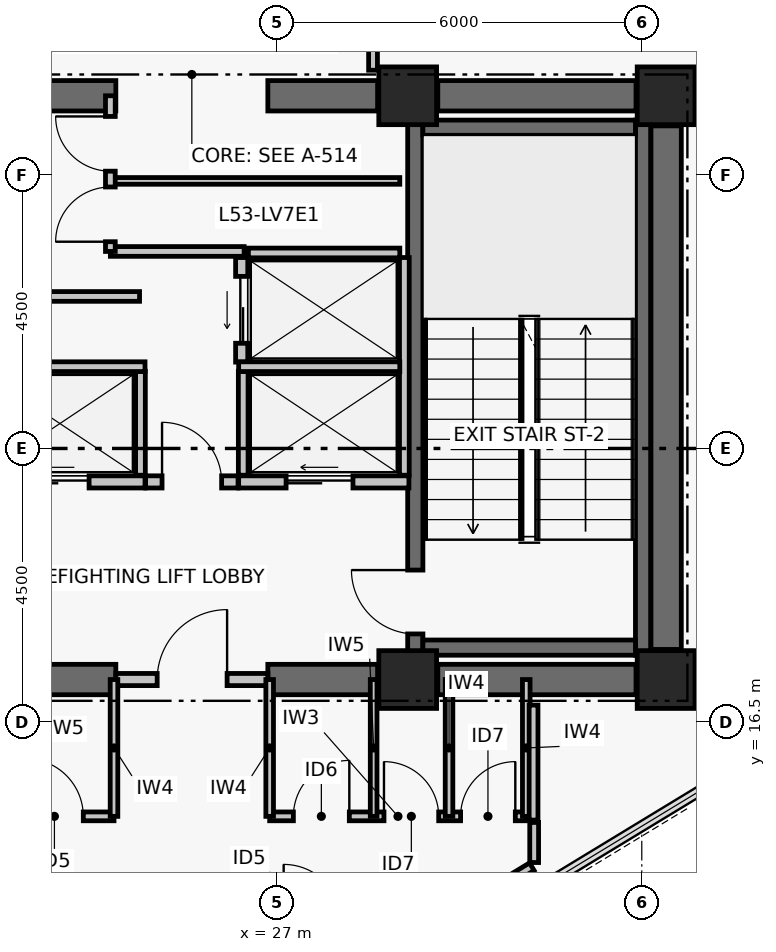
"""IFC4 building model, lengths in metres.
Left out: names, types, materials, properties, quantities, classifications, styles, units other than length and angle.
Written with IfcOpenShell. Run it as: python <this file> out.ifc"""

import sys

from ifc_helpers import new_model, si_unit, direction, frame, frame_2d, origin, origin_2d, place, context, subcontext, project, spatial, rectangle, extrude, element, fill, save


model = new_model("IFC4")
c1 = context("Model", 3, precision=1e-05, world=origin(), true_north=direction((0.0, 1.0)))
c2 = subcontext(c1, "Body", "Model", "MODEL_VIEW")
j1 = project(units=[si_unit("LENGTHUNIT", "METRE"), si_unit("PLANEANGLEUNIT", "RADIAN")], contexts=[c1])
p1 = place(None, origin())
s1 = spatial("IfcSite", under=j1, at=p1, CompositionType="ELEMENT")
p2 = place(p1, origin())
s2 = spatial("IfcBuilding", under=s1, at=p2, CompositionType="ELEMENT")
p3 = place(p2, frame((0.0, 0.0, 210.12)))
s3 = spatial("IfcBuildingStorey", under=s2, at=p3, CompositionType="ELEMENT", Elevation=210.12)
for number, where, z_axis, x_axis in (
    (1, (29.15, 17.2, 0.0), (0.0, 0.0, 1.0), (1.0, 0.0, 0.0)),
    (2, (33.4, 17.2, 0.0), (0.0, 0.0, 1.0), (1.0, 0.0, 0.0)),
    (3, (29.15, 26.8, 0.0), (0.0, 0.0, 1.0), (1.0, 0.0, 0.0)),
    (4, (33.4, 26.8, 0.0), (0.0, 0.0, 1.0), (1.0, 0.0, 0.0)),
):
    element("IfcColumn", number, at=place(p3, frame(where, z_axis=z_axis, x_axis=x_axis)), inside=s3, PredefinedType="COLUMN", context=c2, shape_type="SweptSolid", body=[
        extrude(rectangle(XDim=0.95, YDim=0.95, at=origin_2d()), origin(), (0.0, 0.0, 1.0), 3.72),
    ])
p4 = place(p3, frame((22.545, 17.2, 0.0), z_axis=(0.0, 0.0, 1.0), x_axis=(1.0, 0.0, 0.0)))
e5 = element("IfcWall", 5, at=p4, inside=s3, PredefinedType="SHEAR", context=c2, shape_type="SweptSolid", body=[
    extrude(rectangle(XDim=1.805, YDim=0.5, at=frame_2d((0.903, 0.0))), origin(), (0.0, 0.0, 1.0), 3.38),
])
p5 = place(p3, frame((26.85, 17.2, 0.0), z_axis=(0.0, 0.0, 1.0), x_axis=(1.0, 0.0, 0.0)))
e6 = element("IfcWall", 6, at=p5, inside=s3, PredefinedType="SHEAR", context=c2, shape_type="SweptSolid", body=[
    extrude(rectangle(XDim=1.805, YDim=0.5, at=frame_2d((0.902, 0.0))), origin(), (0.0, 0.0, 1.0), 3.38),
])
p6 = place(p3, frame((29.645, 17.2, 0.0), z_axis=(0.0, 0.0, 1.0), x_axis=(1.0, 0.0, 0.0)))
e7 = element("IfcWall", 7, at=p6, inside=s3, PredefinedType="SHEAR", context=c2, shape_type="SweptSolid", body=[
    extrude(rectangle(XDim=3.26, YDim=0.5, at=frame_2d((1.63, 0.0))), origin(), (0.0, 0.0, 1.0), 3.38),
])
p7 = place(p3, frame((22.545, 26.8, 0.0), z_axis=(0.0, 0.0, 1.0), x_axis=(1.0, 0.0, 0.0)))
e8 = element("IfcWall", 8, at=p7, inside=s3, PredefinedType="SHEAR", context=c2, shape_type="SweptSolid", body=[
    extrude(rectangle(XDim=1.805, YDim=0.5, at=frame_2d((0.903, 0.0))), origin(), (0.0, 0.0, 1.0), 3.38),
])
p8 = place(p3, frame((26.85, 26.8, 0.0), z_axis=(0.0, 0.0, 1.0), x_axis=(1.0, 0.0, 0.0)))
e9 = element("IfcWall", 9, at=p8, inside=s3, PredefinedType="SHEAR", context=c2, shape_type="SweptSolid", body=[
    extrude(rectangle(XDim=1.805, YDim=0.5, at=frame_2d((0.902, 0.0))), origin(), (0.0, 0.0, 1.0), 3.38),
])
p9 = place(p3, frame((29.645, 26.8, 0.0), z_axis=(0.0, 0.0, 1.0), x_axis=(1.0, 0.0, 0.0)))
e10 = element("IfcWall", 10, at=p9, inside=s3, PredefinedType="SHEAR", context=c2, shape_type="SweptSolid", body=[
    extrude(rectangle(XDim=3.26, YDim=0.5, at=frame_2d((1.63, 0.0))), origin(), (0.0, 0.0, 1.0), 3.38),
])
p10 = place(p3, frame((33.4, 17.695, 0.0), z_axis=(0.0, 0.0, 1.0), x_axis=(0.0, 1.0, 0.0)))
e11 = element("IfcWall", 11, at=p10, inside=s3, PredefinedType="SHEAR", context=c2, shape_type="SweptSolid", body=[
    extrude(rectangle(XDim=8.61, YDim=0.5, at=frame_2d((4.305, 0.0))), origin(), (0.0, 0.0, 1.0), 3.38),
])
p11 = place(p3, frame((29.275, 17.6, 0.0), z_axis=(0.0, 0.0, 1.0), x_axis=(0.0, 1.0, 0.0)))
e12 = element("IfcWall", 12, at=p11, inside=s3, PredefinedType="SHEAR", context=c2, shape_type="SweptSolid", body=[
    extrude(rectangle(XDim=8.8, YDim=0.25, at=frame_2d((4.4, 0.0))), origin(), (0.0, 0.0, 1.0), 3.38),
])
p12 = place(p11, frame((0.35, 0.0, 0.0)))
e13 = element("IfcOpeningElement", 13, at=p12, cuts=e12, PredefinedType="OPENING", context=c2, shape_type="SweptSolid", body=[
    extrude(rectangle(XDim=1.05, YDim=2.08, at=frame_2d((0.525, 1.04))), frame((0.0, 0.135, 0.0), z_axis=(0.0, -1.0, 0.0), x_axis=(1.0, 0.0, 0.0)), (0.0, 0.0, 1.0), 0.27),
])
p13 = place(p3, frame((33.021, 17.6, 0.0), z_axis=(0.0, 0.0, 1.0), x_axis=(0.0, 1.0, 0.0)))
e14 = element("IfcWall", 14, at=p13, inside=s3, PredefinedType="SHEAR", context=c2, shape_type="SweptSolid", body=[
    extrude(rectangle(XDim=8.8, YDim=0.25, at=frame_2d((4.4, 0.0))), origin(), (0.0, 0.0, 1.0), 3.38),
])
for number, where, z_axis, x_axis in (
    (15, (29.4, 17.725, 0.0), (0.0, 0.0, 1.0), (1.0, 0.0, 0.0)),
    (16, (29.4, 26.275, 0.0), (0.0, 0.0, 1.0), (1.0, 0.0, 0.0)),
):
    element("IfcWall", number, at=place(p3, frame(where, z_axis=z_axis, x_axis=x_axis)), inside=s3, PredefinedType="SHEAR", context=c2, shape_type="SweptSolid", body=[
        extrude(rectangle(XDim=3.496, YDim=0.25, at=frame_2d((1.748, 0.0))), origin(), (0.0, 0.0, 1.0), 3.38),
    ])
p14 = place(p3, frame((24.35, 17.2, 0.0), z_axis=(0.0, 0.0, 1.0), x_axis=(1.0, 0.0, 0.0)))
e17 = element("IfcWall", 17, at=p14, inside=s3, PredefinedType="PARTITIONING", context=c2, shape_type="SweptSolid", body=[
    extrude(rectangle(XDim=2.5, YDim=0.2, at=frame_2d((1.25, 0.0))), origin(), (0.0, 0.0, 1.0), 2.51),
])
p15 = place(p14, frame((0.68, 0.0, 0.0)))
e18 = element("IfcOpeningElement", 18, at=p15, cuts=e17, PredefinedType="OPENING", context=c2, shape_type="SweptSolid", body=[
    extrude(rectangle(XDim=1.15, YDim=2.08, at=frame_2d((0.575, 1.04))), frame((0.0, 0.11, 0.0), z_axis=(0.0, -1.0, 0.0), x_axis=(1.0, 0.0, 0.0)), (0.0, 0.0, 1.0), 0.22),
])
p16 = place(p3, frame((24.84, 20.45, 0.0), z_axis=(0.0, 0.0, 1.0), x_axis=(1.0, 0.0, 0.0)))
e19 = element("IfcWall", 19, at=p16, inside=s3, PredefinedType="PARTITIONING", context=c2, shape_type="SweptSolid", body=[
    extrude(rectangle(XDim=1.52, YDim=0.2, at=frame_2d((0.76, 0.0))), origin(), (0.0, 0.0, 1.0), 3.38),
])
p17 = place(p16, frame((0.27, 0.0, 0.0)))
e20 = element("IfcOpeningElement", 20, at=p17, cuts=e19, PredefinedType="OPENING", context=c2, shape_type="SweptSolid", body=[
    extrude(rectangle(XDim=0.98, YDim=2.06, at=frame_2d((0.49, 1.03))), frame((0.0, 0.11, 0.0), z_axis=(0.0, -1.0, 0.0), x_axis=(1.0, 0.0, 0.0)), (0.0, 0.0, 1.0), 0.22),
])
p18 = place(p3, frame((22.03, 20.45, 0.0), z_axis=(0.0, 0.0, 1.0), x_axis=(1.0, 0.0, 0.0)))
e21 = element("IfcWall", 21, at=p18, inside=s3, PredefinedType="PARTITIONING", context=c2, shape_type="SweptSolid", body=[
    extrude(rectangle(XDim=2.8, YDim=0.2, at=frame_2d((1.4, 0.0))), origin(), (0.0, 0.0, 1.0), 3.38),
])
p19 = place(p18, frame((0.78, 0.0, 0.0)))
e22 = element("IfcOpeningElement", 22, at=p19, cuts=e21, PredefinedType="OPENING", context=c2, shape_type="SweptSolid", body=[
    extrude(rectangle(XDim=1.1, YDim=2.08, at=frame_2d((0.55, 1.04))), frame((0.0, 0.11, 0.0), z_axis=(0.0, -1.0, 0.0), x_axis=(1.0, 0.0, 0.0)), (0.0, 0.0, 1.0), 0.22),
])
p20 = place(p3, frame((26.37, 20.45, 0.0), z_axis=(0.0, 0.0, 1.0), x_axis=(1.0, 0.0, 0.0)))
e23 = element("IfcWall", 23, at=p20, inside=s3, PredefinedType="PARTITIONING", context=c2, shape_type="SweptSolid", body=[
    extrude(rectangle(XDim=2.8, YDim=0.2, at=frame_2d((1.4, 0.0))), origin(), (0.0, 0.0, 1.0), 3.38),
])
p21 = place(p20, frame((0.78, 0.0, 0.0)))
e24 = element("IfcOpeningElement", 24, at=p21, cuts=e23, PredefinedType="OPENING", context=c2, shape_type="SweptSolid", body=[
    extrude(rectangle(XDim=1.1, YDim=2.08, at=frame_2d((0.55, 1.04))), frame((0.0, 0.11, 0.0), z_axis=(0.0, -1.0, 0.0), x_axis=(1.0, 0.0, 0.0)), (0.0, 0.0, 1.0), 0.22),
])
p22 = place(p3, frame((26.42, 22.42, 0.0), z_axis=(0.0, 0.0, 1.0), x_axis=(0.0, 1.0, 0.0)))
e25 = element("IfcWall", 25, at=p22, inside=s3, PredefinedType="PARTITIONING", context=c2, shape_type="SweptSolid", body=[
    extrude(rectangle(XDim=1.72, YDim=0.2, at=frame_2d((0.86, 0.0))), origin(), (0.0, 0.0, 1.0), 3.38),
])
p23 = place(p22, frame((0.31, 0.0, 0.0)))
e26 = element("IfcOpeningElement", 26, at=p23, cuts=e25, PredefinedType="OPENING", context=c2, shape_type="SweptSolid", body=[
    extrude(rectangle(XDim=1.1, YDim=2.08, at=frame_2d((0.55, 1.04))), frame((0.0, 0.11, 0.0), z_axis=(0.0, -1.0, 0.0), x_axis=(1.0, 0.0, 0.0)), (0.0, 0.0, 1.0), 0.22),
])
p24 = place(p3, frame((24.755, 20.56, 0.0), z_axis=(0.0, 0.0, 1.0), x_axis=(0.0, 1.0, 0.0)))
e27 = element("IfcWall", 27, at=p24, inside=s3, PredefinedType="PARTITIONING", context=c2, shape_type="SweptSolid", body=[
    extrude(rectangle(XDim=1.71, YDim=0.16, at=frame_2d((0.855, 0.0))), origin(), (0.0, 0.0, 1.0), 3.38),
])
p25 = place(p3, frame((22.18, 22.345, 0.0), z_axis=(0.0, 0.0, 1.0), x_axis=(1.0, 0.0, 0.0)))
e28 = element("IfcWall", 28, at=p25, inside=s3, PredefinedType="PARTITIONING", context=c2, shape_type="SweptSolid", body=[
    extrude(rectangle(XDim=2.65, YDim=0.16, at=frame_2d((1.325, 0.0))), origin(), (0.0, 0.0, 1.0), 3.38),
])
p26 = place(p3, frame((29.095, 20.56, 0.0), z_axis=(0.0, 0.0, 1.0), x_axis=(0.0, 1.0, 0.0)))
e29 = element("IfcWall", 29, at=p26, inside=s3, PredefinedType="PARTITIONING", context=c2, shape_type="SweptSolid", body=[
    extrude(rectangle(XDim=3.58, YDim=0.16, at=frame_2d((1.79, 0.0))), origin(), (0.0, 0.0, 1.0), 3.38),
])
p27 = place(p3, frame((26.445, 20.56, 0.0), z_axis=(0.0, 0.0, 1.0), x_axis=(0.0, 1.0, 0.0)))
e30 = element("IfcWall", 30, at=p27, inside=s3, PredefinedType="PARTITIONING", context=c2, shape_type="SweptSolid", body=[
    extrude(rectangle(XDim=1.71, YDim=0.16, at=frame_2d((0.855, 0.0))), origin(), (0.0, 0.0, 1.0), 3.38),
])
p28 = place(p3, frame((26.37, 22.345, 0.0), z_axis=(0.0, 0.0, 1.0), x_axis=(1.0, 0.0, 0.0)))
e31 = element("IfcWall", 31, at=p28, inside=s3, PredefinedType="PARTITIONING", context=c2, shape_type="SweptSolid", body=[
    extrude(rectangle(XDim=2.65, YDim=0.16, at=frame_2d((1.325, 0.0))), origin(), (0.0, 0.0, 1.0), 3.38),
])
p29 = place(p3, frame((26.53, 24.215, 0.0), z_axis=(0.0, 0.0, 1.0), x_axis=(1.0, 0.0, 0.0)))
e32 = element("IfcWall", 32, at=p29, inside=s3, PredefinedType="PARTITIONING", context=c2, shape_type="SweptSolid", body=[
    extrude(rectangle(XDim=2.49, YDim=0.16, at=frame_2d((1.245, 0.0))), origin(), (0.0, 0.0, 1.0), 3.38),
])
p30 = place(p3, frame((23.04, 23.5, 0.0), z_axis=(0.0, 0.0, 1.0), x_axis=(1.0, 0.0, 0.0)))
e33 = element("IfcWall", 33, at=p30, inside=s3, PredefinedType="PARTITIONING", context=c2, shape_type="SweptSolid", body=[
    extrude(rectangle(XDim=1.7, YDim=0.16, at=frame_2d((0.85, 0.0))), origin(), (0.0, 0.0, 1.0), 3.38),
])
p31 = place(p3, frame((24.26, 24.24, 0.0), z_axis=(0.0, 0.0, 1.0), x_axis=(1.0, 0.0, 0.0)))
e34 = element("IfcWall", 34, at=p31, inside=s3, PredefinedType="PARTITIONING", context=c2, shape_type="SweptSolid", body=[
    extrude(rectangle(XDim=2.2, YDim=0.16, at=frame_2d((1.1, 0.0))), origin(), (0.0, 0.0, 1.0), 3.38),
])
p32 = place(p3, frame((24.26, 25.4, 0.0), z_axis=(0.0, 0.0, 1.0), x_axis=(1.0, 0.0, 0.0)))
e35 = element("IfcWall", 35, at=p32, inside=s3, PredefinedType="PARTITIONING", context=c2, shape_type="SweptSolid", body=[
    extrude(rectangle(XDim=4.76, YDim=0.11, at=frame_2d((2.38, 0.0))), origin(), (0.0, 0.0, 1.0), 3.38),
])
p33 = place(p3, frame((24.26, 24.24, 0.0), z_axis=(0.0, 0.0, 1.0), x_axis=(0.0, 1.0, 0.0)))
e36 = element("IfcWall", 36, at=p33, inside=s3, PredefinedType="PARTITIONING", context=c2, shape_type="SweptSolid", body=[
    extrude(rectangle(XDim=2.56, YDim=0.16, at=frame_2d((1.28, 0.0))), origin(), (0.0, 0.0, 1.0), 2.51),
])
p34 = place(p33, frame((0.16, 0.0, 0.0)))
e37 = element("IfcOpeningElement", 37, at=p34, cuts=e36, PredefinedType="OPENING", context=c2, shape_type="SweptSolid", body=[
    extrude(rectangle(XDim=0.9, YDim=2.02, at=frame_2d((0.45, 1.01))), frame((0.0, 0.09, 0.0), z_axis=(0.0, -1.0, 0.0), x_axis=(1.0, 0.0, 0.0)), (0.0, 0.0, 1.0), 0.18),
])
p35 = place(p33, frame((1.32, 0.0, 0.0)))
e38 = element("IfcOpeningElement", 38, at=p35, cuts=e36, PredefinedType="OPENING", context=c2, shape_type="SweptSolid", body=[
    extrude(rectangle(XDim=0.9, YDim=2.02, at=frame_2d((0.45, 1.01))), frame((0.0, 0.09, 0.0), z_axis=(0.0, -1.0, 0.0), x_axis=(1.0, 0.0, 0.0)), (0.0, 0.0, 1.0), 0.18),
])
p36 = place(p3, frame((19.1, 14.95, 0.0), z_axis=(0.0, 0.0, 1.0), x_axis=(1.0, 0.0, 0.0)))
e39 = element("IfcWall", 39, at=p36, inside=s3, PredefinedType="PARTITIONING", context=c2, shape_type="SweptSolid", body=[
    extrude(rectangle(XDim=5.22, YDim=0.145, at=frame_2d((2.61, 0.0))), origin(), (0.0, 0.0, 1.0), 2.61),
])
p37 = place(p36, frame((0.2, 0.0, 0.0)))
e40 = element("IfcOpeningElement", 40, at=p37, cuts=e39, PredefinedType="OPENING", context=c2, shape_type="SweptSolid", body=[
    extrude(rectangle(XDim=0.9, YDim=2.02, at=frame_2d((0.45, 1.01))), frame((0.0, 0.083, 0.0), z_axis=(0.0, -1.0, 0.0), x_axis=(1.0, 0.0, 0.0)), (0.0, 0.0, 1.0), 0.165),
])
p38 = place(p36, frame((1.805, 0.0, 0.0)))
e41 = element("IfcOpeningElement", 41, at=p38, cuts=e39, PredefinedType="OPENING", context=c2, shape_type="SweptSolid", body=[
    extrude(rectangle(XDim=0.95, YDim=2.06, at=frame_2d((0.475, 1.03))), frame((0.0, 0.083, 0.0), z_axis=(0.0, -1.0, 0.0), x_axis=(1.0, 0.0, 0.0)), (0.0, 0.0, 1.0), 0.165),
])
p39 = place(p36, frame((3.765, 0.0, 0.0)))
e42 = element("IfcOpeningElement", 42, at=p39, cuts=e39, PredefinedType="OPENING", context=c2, shape_type="SweptSolid", body=[
    extrude(rectangle(XDim=0.95, YDim=2.06, at=frame_2d((0.475, 1.03))), frame((0.0, 0.083, 0.0), z_axis=(0.0, -1.0, 0.0), x_axis=(1.0, 0.0, 0.0)), (0.0, 0.0, 1.0), 0.165),
])
p40 = place(p3, frame((26.88, 14.95, 0.0), z_axis=(0.0, 0.0, 1.0), x_axis=(1.0, 0.0, 0.0)))
e43 = element("IfcWall", 43, at=p40, inside=s3, PredefinedType="PARTITIONING", context=c2, shape_type="SweptSolid", body=[
    extrude(rectangle(XDim=4.22, YDim=0.145, at=frame_2d((2.11, 0.0))), origin(), (0.0, 0.0, 1.0), 2.81),
])
p41 = place(p40, frame((0.39, 0.0, 0.0)))
e44 = element("IfcOpeningElement", 44, at=p41, cuts=e43, PredefinedType="OPENING", context=c2, shape_type="SweptSolid", body=[
    extrude(rectangle(XDim=0.92, YDim=2.05, at=frame_2d((0.46, 1.025))), frame((0.0, 0.083, 0.0), z_axis=(0.0, -1.0, 0.0), x_axis=(1.0, 0.0, 0.0)), (0.0, 0.0, 1.0), 0.165),
])
p42 = place(p40, frame((1.88, 0.0, 0.0)))
e45 = element("IfcOpeningElement", 45, at=p42, cuts=e43, PredefinedType="OPENING", context=c2, shape_type="SweptSolid", body=[
    extrude(rectangle(XDim=0.9, YDim=2.02, at=frame_2d((0.45, 1.01))), frame((0.0, 0.083, 0.0), z_axis=(0.0, -1.0, 0.0), x_axis=(1.0, 0.0, 0.0)), (0.0, 0.0, 1.0), 0.165),
])
p43 = place(p40, frame((3.14, 0.0, 0.0)))
e46 = element("IfcOpeningElement", 46, at=p43, cuts=e43, PredefinedType="OPENING", context=c2, shape_type="SweptSolid", body=[
    extrude(rectangle(XDim=0.9, YDim=2.02, at=frame_2d((0.45, 1.01))), frame((0.0, 0.083, 0.0), z_axis=(0.0, -1.0, 0.0), x_axis=(1.0, 0.0, 0.0)), (0.0, 0.0, 1.0), 0.165),
])
for number, where, z_axis, x_axis in (
    (47, (24.32, 14.95, 0.0), (0.0, 0.0, 1.0), (0.0, 1.0, 0.0)),
    (48, (26.88, 14.95, 0.0), (0.0, 0.0, 1.0), (0.0, 1.0, 0.0)),
):
    element("IfcWall", number, at=place(p3, frame(where, z_axis=z_axis, x_axis=x_axis)), inside=s3, PredefinedType="PARTITIONING", context=c2, shape_type="SweptSolid", body=[
        extrude(rectangle(XDim=2.25, YDim=0.125, at=frame_2d((1.125, 0.0))), origin(), (0.0, 0.0, 1.0), 2.51),
    ])
p44 = place(p3, frame((28.59, 14.95, 0.0), z_axis=(0.0, 0.0, 1.0), x_axis=(0.0, 1.0, 0.0)))
e49 = element("IfcWall", 49, at=p44, inside=s3, PredefinedType="PARTITIONING", context=c2, shape_type="SweptSolid", body=[
    extrude(rectangle(XDim=2.25, YDim=0.11, at=frame_2d((1.125, 0.0))), origin(), (0.0, 0.0, 1.0), 2.51),
])
for number, where, z_axis, x_axis in (
    (50, (29.83, 14.95, 0.0), (0.0, 0.0, 1.0), (0.0, 1.0, 0.0)),
    (51, (31.1, 14.95, 0.0), (0.0, 0.0, 1.0), (0.0, 1.0, 0.0)),
):
    element("IfcWall", number, at=place(p3, frame(where, z_axis=z_axis, x_axis=x_axis)), inside=s3, PredefinedType="PARTITIONING", context=c2, shape_type="SweptSolid", body=[
        extrude(rectangle(XDim=2.25, YDim=0.125, at=frame_2d((1.125, 0.0))), origin(), (0.0, 0.0, 1.0), 2.51),
    ])
p45 = place(p3, frame((29.709, 13.222, 0.0), z_axis=(0.0, 0.0, 1.0), x_axis=(0.854635840942, 0.519227868451, 0.0)))
e52 = element("IfcWall", 52, at=p45, inside=s3, PredefinedType="PARTITIONING", context=c2, shape_type="SweptSolid", body=[
    extrude(rectangle(XDim=1.735, YDim=0.145, at=frame_2d((0.867, 0.0))), origin(), (0.0, 0.0, 1.0), 3.38),
])
p46 = place(p3, frame((31.23, 14.191, 0.0), z_axis=(0.0, 0.0, 1.0), x_axis=(0.0, 1.0, 0.0)))
e53 = element("IfcWall", 53, at=p46, inside=s3, PredefinedType="PARTITIONING", context=c2, shape_type="SweptSolid", body=[
    extrude(rectangle(XDim=0.659, YDim=0.145, at=frame_2d((0.33, 0.0))), origin(), (0.0, 0.0, 1.0), 3.38),
])
p47 = place(p3, frame((31.22, 14.889, 0.0), z_axis=(0.0, 0.0, 1.0), x_axis=(0.0, 1.0, 0.0)))
e54 = element("IfcWall", 54, at=p47, inside=s3, PredefinedType="PARTITIONING", context=c2, shape_type="SweptSolid", body=[
    extrude(rectangle(XDim=1.891, YDim=0.145, at=frame_2d((0.946, 0.0))), origin(), (0.0, 0.0, 1.0), 2.51),
])
p48 = place(p3, frame((28.58, 27.22, 0.0), z_axis=(0.0, 0.0, 1.0), x_axis=(0.0, 1.0, 0.0)))
e55 = element("IfcWall", 55, at=p48, inside=s3, PredefinedType="PARTITIONING", context=c2, shape_type="SweptSolid", body=[
    extrude(rectangle(XDim=1.48, YDim=0.145, at=frame_2d((0.74, 0.0))), origin(), (0.0, 0.0, 1.0), 2.51),
])
p49 = place(p12, origin())
e56 = element("IfcDoor", 56, at=p49, inside=s3, OperationType="SINGLE_SWING_RIGHT", PredefinedType="DOOR", context=c2, shape_type="SweptSolid", body=[
    extrude(rectangle(XDim=1.05, YDim=2.08, at=frame_2d((0.525, 1.04))), frame((0.0, 0.025, 0.0), z_axis=(0.0, -1.0, 0.0), x_axis=(1.0, 0.0, 0.0)), (0.0, 0.0, 1.0), 0.05),
])
fill(e13, e56)
p50 = place(p15, origin())
e57 = element("IfcDoor", 57, at=p50, inside=s3, OperationType="SINGLE_SWING_RIGHT", PredefinedType="DOOR", context=c2, shape_type="SweptSolid", body=[
    extrude(rectangle(XDim=1.15, YDim=2.08, at=frame_2d((0.575, 1.04))), frame((0.0, 0.025, 0.0), z_axis=(0.0, -1.0, 0.0), x_axis=(1.0, 0.0, 0.0)), (0.0, 0.0, 1.0), 0.05),
])
fill(e18, e57)
p51 = place(p17, origin())
e58 = element("IfcDoor", 58, at=p51, inside=s3, OperationType="SINGLE_SWING_LEFT", PredefinedType="DOOR", context=c2, shape_type="SweptSolid", body=[
    extrude(rectangle(XDim=0.98, YDim=2.06, at=frame_2d((0.49, 1.03))), frame((0.0, 0.025, 0.0), z_axis=(0.0, -1.0, 0.0), x_axis=(1.0, 0.0, 0.0)), (0.0, 0.0, 1.0), 0.05),
])
fill(e20, e58)
p52 = place(p19, origin())
e59 = element("IfcDoor", 59, at=p52, inside=s3, OperationType="DOUBLE_DOOR_SLIDING", PredefinedType="DOOR", context=c2, shape_type="SweptSolid", body=[
    extrude(rectangle(XDim=1.1, YDim=2.08, at=frame_2d((0.55, 1.04))), frame((0.0, 0.025, 0.0), z_axis=(0.0, -1.0, 0.0), x_axis=(1.0, 0.0, 0.0)), (0.0, 0.0, 1.0), 0.05),
])
fill(e22, e59)
p53 = place(p21, origin())
e60 = element("IfcDoor", 60, at=p53, inside=s3, OperationType="DOUBLE_DOOR_SLIDING", PredefinedType="DOOR", context=c2, shape_type="SweptSolid", body=[
    extrude(rectangle(XDim=1.1, YDim=2.08, at=frame_2d((0.55, 1.04))), frame((0.0, 0.025, 0.0), z_axis=(0.0, -1.0, 0.0), x_axis=(1.0, 0.0, 0.0)), (0.0, 0.0, 1.0), 0.05),
])
fill(e24, e60)
p54 = place(p23, origin())
e61 = element("IfcDoor", 61, at=p54, inside=s3, OperationType="DOUBLE_DOOR_SLIDING", PredefinedType="DOOR", context=c2, shape_type="SweptSolid", body=[
    extrude(rectangle(XDim=1.1, YDim=2.08, at=frame_2d((0.55, 1.04))), frame((0.0, 0.025, 0.0), z_axis=(0.0, -1.0, 0.0), x_axis=(1.0, 0.0, 0.0)), (0.0, 0.0, 1.0), 0.05),
])
fill(e26, e61)
p55 = place(p34, origin())
e62 = element("IfcDoor", 62, at=p55, inside=s3, OperationType="SINGLE_SWING_LEFT", PredefinedType="DOOR", context=c2, shape_type="SweptSolid", body=[
    extrude(rectangle(XDim=0.9, YDim=2.02, at=frame_2d((0.45, 1.01))), frame((0.0, 0.025, 0.0), z_axis=(0.0, -1.0, 0.0), x_axis=(1.0, 0.0, 0.0)), (0.0, 0.0, 1.0), 0.05),
])
fill(e37, e62)
p56 = place(p35, origin())
e63 = element("IfcDoor", 63, at=p56, inside=s3, OperationType="SINGLE_SWING_RIGHT", PredefinedType="DOOR", context=c2, shape_type="SweptSolid", body=[
    extrude(rectangle(XDim=0.9, YDim=2.02, at=frame_2d((0.45, 1.01))), frame((0.0, 0.025, 0.0), z_axis=(0.0, -1.0, 0.0), x_axis=(1.0, 0.0, 0.0)), (0.0, 0.0, 1.0), 0.05),
])
fill(e38, e63)
p57 = place(p39, origin())
e64 = element("IfcDoor", 64, at=p57, inside=s3, OperationType="SINGLE_SWING_LEFT", PredefinedType="DOOR", context=c2, shape_type="SweptSolid", body=[
    extrude(rectangle(XDim=0.95, YDim=2.06, at=frame_2d((0.475, 1.03))), frame((0.0, 0.025, 0.0), z_axis=(0.0, -1.0, 0.0), x_axis=(1.0, 0.0, 0.0)), (0.0, 0.0, 1.0), 0.05),
])
fill(e42, e64)
p58 = place(p41, origin())
e65 = element("IfcDoor", 65, at=p58, inside=s3, OperationType="SINGLE_SWING_RIGHT", PredefinedType="DOOR", context=c2, shape_type="SweptSolid", body=[
    extrude(rectangle(XDim=0.92, YDim=2.05, at=frame_2d((0.46, 1.025))), frame((0.0, 0.025, 0.0), z_axis=(0.0, -1.0, 0.0), x_axis=(1.0, 0.0, 0.0)), (0.0, 0.0, 1.0), 0.05),
])
fill(e44, e65)
p59 = place(p42, origin())
e66 = element("IfcDoor", 66, at=p59, inside=s3, OperationType="SINGLE_SWING_LEFT", PredefinedType="DOOR", context=c2, shape_type="SweptSolid", body=[
    extrude(rectangle(XDim=0.9, YDim=2.02, at=frame_2d((0.45, 1.01))), frame((0.0, 0.025, 0.0), z_axis=(0.0, -1.0, 0.0), x_axis=(1.0, 0.0, 0.0)), (0.0, 0.0, 1.0), 0.05),
])
fill(e45, e66)
p60 = place(p43, origin())
e67 = element("IfcDoor", 67, at=p60, inside=s3, OperationType="SINGLE_SWING_RIGHT", PredefinedType="DOOR", context=c2, shape_type="SweptSolid", body=[
    extrude(rectangle(XDim=0.9, YDim=2.02, at=frame_2d((0.45, 1.01))), frame((0.0, 0.025, 0.0), z_axis=(0.0, -1.0, 0.0), x_axis=(1.0, 0.0, 0.0)), (0.0, 0.0, 1.0), 0.05),
])
fill(e46, e67)
save(model, sys.argv[1])
